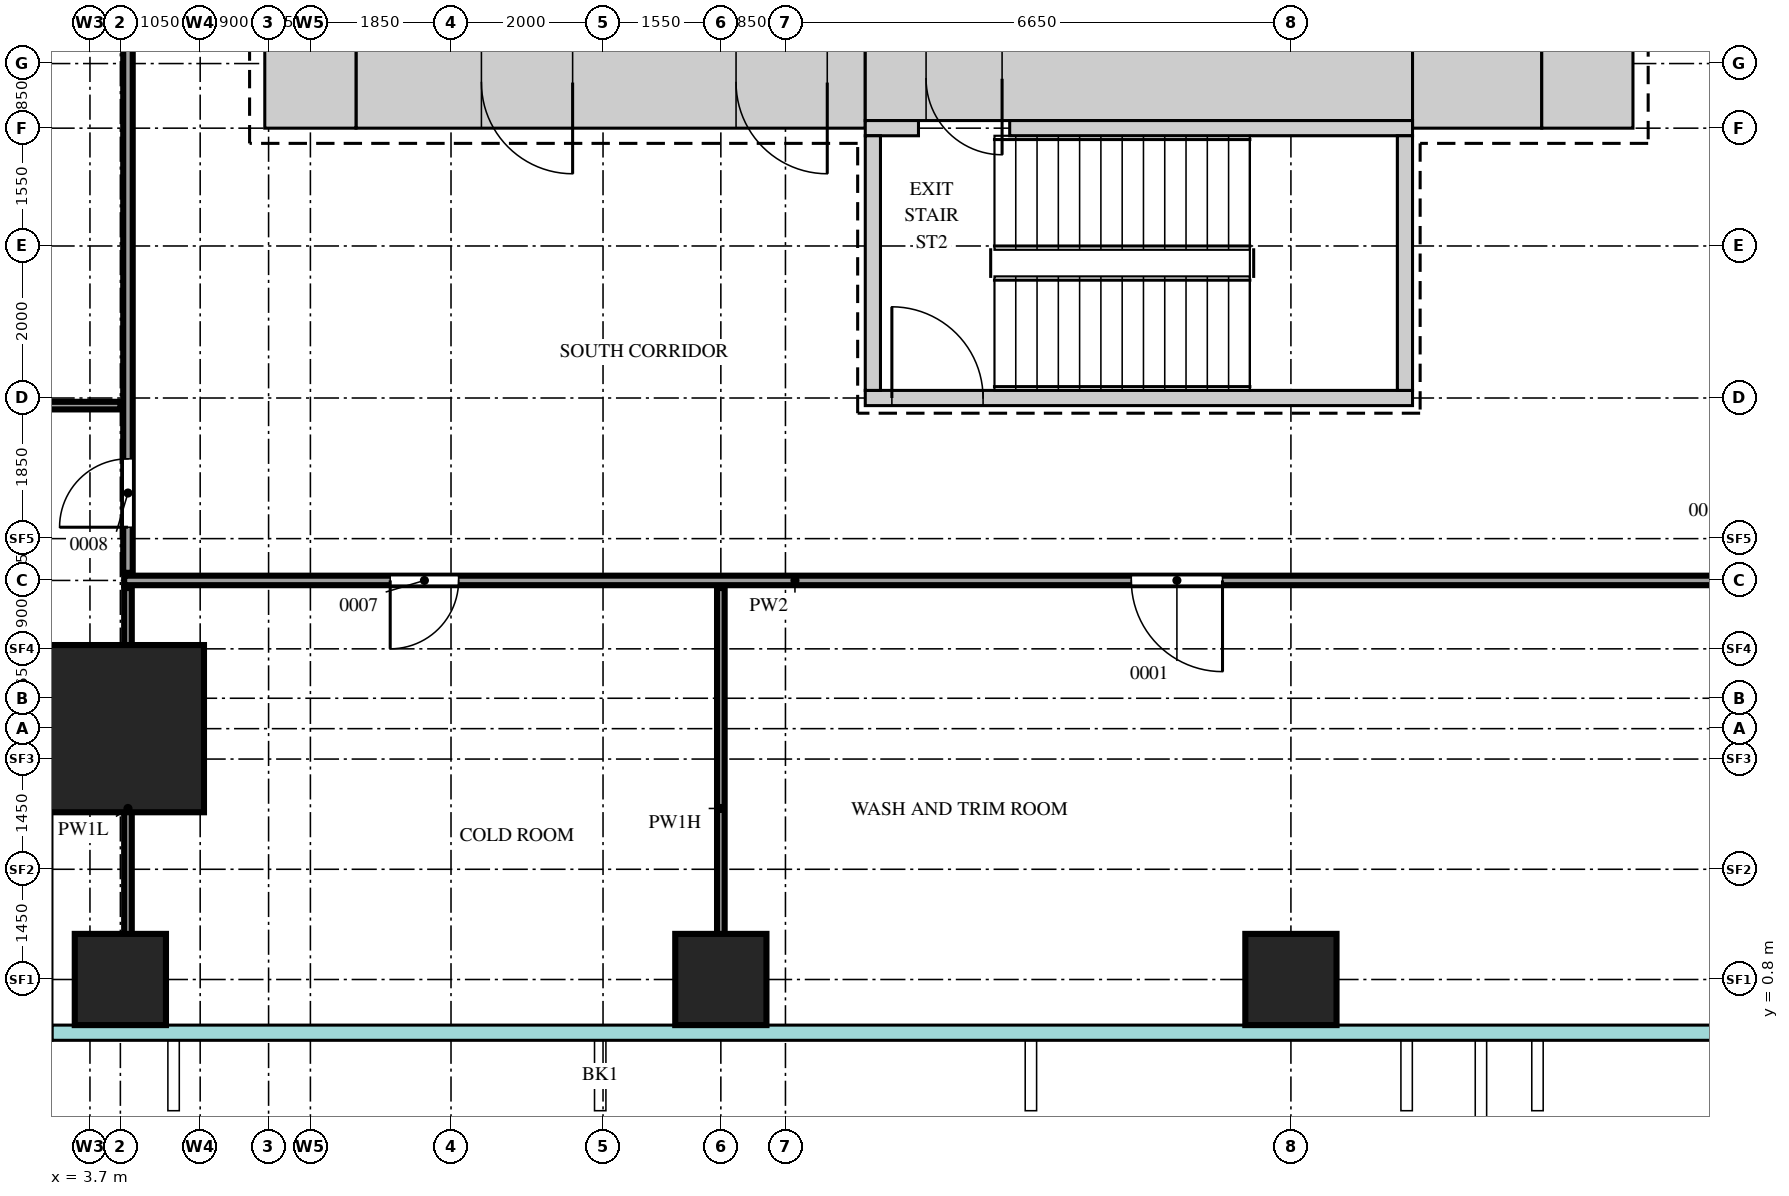
"""IFC4 building model, lengths in metres.
Left out: names, types, materials, properties, quantities, classifications, styles, units other than length and angle.
Written with IfcOpenShell. Run it as: python <this file> out.ifc"""

import sys

from ifc_helpers import new_model, si_unit, direction, frame, frame_2d, origin, origin_2d, place, context, subcontext, project, spatial, rectangle, extrude, source, transform, mapped, element, fill, save


model = new_model("IFC4")
c1 = context("Model", 3, precision=1e-05, world=origin(), true_north=direction((0.0, 1.0)))
c2 = subcontext(c1, "Body", "Model", "MODEL_VIEW")
j1 = project(units=[si_unit("LENGTHUNIT", "METRE"), si_unit("PLANEANGLEUNIT", "RADIAN")], contexts=[c1])
p1 = place(None, origin())
s1 = spatial("IfcSite", under=j1, at=p1, CompositionType="ELEMENT")
p2 = place(p1, origin())
s2 = spatial("IfcBuilding", under=s1, at=p2, CompositionType="ELEMENT")
p3 = place(p2, frame((0.0, 0.0, 33.0)))
s3 = spatial("IfcBuildingStorey", under=s2, at=p3, CompositionType="ELEMENT", Elevation=33.0)
m1 = source(origin(), c2, "Body", "SweptSolid", [
    extrude(rectangle(XDim=6.7, YDim=1.2, at=frame_2d((3.35, 0.0))), origin(), (0.0, 0.0, 1.0), 4.2),
])
p4 = place(p3, frame((7.2, 12.6, 0.0), z_axis=(0.0, 0.0, 1.0), x_axis=(1.0, 0.0, 0.0)))
e1 = element("IfcWall", 1, at=p4, inside=s3, PredefinedType="SHEAR", context=c2, shape_type="MappedRepresentation", body=[
    mapped(m1, transform((0.0, 0.0, 0.0))),
])
m2 = source(origin(), c2, "Body", "SweptSolid", [
    extrude(rectangle(XDim=1.2, YDim=2.1, at=frame_2d((0.6, 1.05))), frame((0.0, 0.61, 0.0), z_axis=(0.0, -1.0, 0.0), x_axis=(1.0, 0.0, 0.0)), (0.0, 0.0, 1.0), 1.22),
])
p5 = place(p4, frame((5.0, 0.0, 0.0)))
e2 = element("IfcOpeningElement", 2, at=p5, cuts=e1, PredefinedType="OPENING", context=c2, shape_type="MappedRepresentation", body=[
    mapped(m2, transform((0.0, 0.0, 0.0))),
])
p6 = place(p4, frame((1.65, 0.0, 0.0)))
e3 = element("IfcOpeningElement", 3, at=p6, cuts=e1, PredefinedType="OPENING", context=c2, shape_type="MappedRepresentation", body=[
    mapped(m2, transform((0.0, 0.0, 0.0))),
])
m3 = source(origin(), c2, "Body", "SweptSolid", [
    extrude(rectangle(XDim=7.2, YDim=1.1, at=frame_2d((3.6, 0.0))), origin(), (0.0, 0.0, 1.0), 4.2),
])
p7 = place(p3, frame((13.9, 12.65, 0.0), z_axis=(0.0, 0.0, 1.0), x_axis=(1.0, 0.0, 0.0)))
e4 = element("IfcWall", 4, at=p7, inside=s3, PredefinedType="SHEAR", context=c2, shape_type="MappedRepresentation", body=[
    mapped(m3, transform((0.0, 0.0, 0.0))),
])
m4 = source(origin(), c2, "Body", "SweptSolid", [
    extrude(rectangle(XDim=1.0, YDim=2.1, at=frame_2d((0.5, 1.05))), frame((0.0, 0.56, 0.0), z_axis=(0.0, -1.0, 0.0), x_axis=(1.0, 0.0, 0.0)), (0.0, 0.0, 1.0), 1.12),
])
p8 = place(p7, frame((0.8, 0.0, 0.0)))
e5 = element("IfcOpeningElement", 5, at=p8, cuts=e4, PredefinedType="OPENING", context=c2, shape_type="MappedRepresentation", body=[
    mapped(m4, transform((0.0, 0.0, 0.0))),
])
m5 = source(origin(), c2, "Body", "SweptSolid", [
    extrude(rectangle(XDim=1.7, YDim=1.2, at=frame_2d((0.85, 0.0))), origin(), (0.0, 0.0, 1.0), 4.2),
])
p9 = place(p3, frame((21.1, 12.6, 0.0), z_axis=(0.0, 0.0, 1.0), x_axis=(1.0, 0.0, 0.0)))
e6 = element("IfcWall", 6, at=p9, inside=s3, PredefinedType="SHEAR", context=c2, shape_type="MappedRepresentation", body=[
    mapped(m5, transform((0.0, 0.0, 0.0))),
])
m6 = source(origin(), c2, "Body", "SweptSolid", [
    extrude(rectangle(XDim=1.2, YDim=1.2, at=frame_2d((0.6, 0.0))), origin(), (0.0, 0.0, 1.0), 4.2),
])
for number, where, z_axis, x_axis in (
    (7, (22.8, 12.6, 0.0), (0.0, 0.0, 1.0), (1.0, 0.0, 0.0)),
    (8, (6.0, 12.6, 0.0), (0.0, 0.0, 1.0), (1.0, 0.0, 0.0)),
):
    element("IfcWall", number, at=place(p3, frame(where, z_axis=z_axis, x_axis=x_axis)), inside=s3, PredefinedType="SHEAR", context=c2, shape_type="MappedRepresentation", body=[
        mapped(m6, transform((0.0, 0.0, 0.0))),
    ])
m7 = source(origin(), c2, "Body", "SweptSolid", [
    extrude(rectangle(XDim=0.7, YDim=0.2, at=frame_2d((0.35, 0.0))), origin(), (0.0, 0.0, 1.0), 4.2),
])
p10 = place(p3, frame((13.9, 12.0, 0.0), z_axis=(0.0, 0.0, 1.0), x_axis=(1.0, 0.0, 0.0)))
e9 = element("IfcWall", 9, at=p10, inside=s3, PredefinedType="SHEAR", context=c2, shape_type="MappedRepresentation", body=[
    mapped(m7, transform((0.0, 0.0, 0.0))),
])
m8 = source(origin(), c2, "Body", "SweptSolid", [
    extrude(rectangle(XDim=5.3, YDim=0.2, at=frame_2d((2.65, 0.0))), origin(), (0.0, 0.0, 1.0), 4.2),
])
p11 = place(p3, frame((15.8, 12.0, 0.0), z_axis=(0.0, 0.0, 1.0), x_axis=(1.0, 0.0, 0.0)))
e10 = element("IfcWall", 10, at=p11, inside=s3, PredefinedType="SHEAR", context=c2, shape_type="MappedRepresentation", body=[
    mapped(m8, transform((0.0, 0.0, 0.0))),
])
m9 = source(origin(), c2, "Body", "SweptSolid", [
    extrude(rectangle(XDim=7.2, YDim=0.2, at=frame_2d((3.6, 0.0))), origin(), (0.0, 0.0, 1.0), 4.2),
])
p12 = place(p3, frame((13.9, 8.45, 0.0), z_axis=(0.0, 0.0, 1.0), x_axis=(1.0, 0.0, 0.0)))
e11 = element("IfcWall", 11, at=p12, inside=s3, PredefinedType="SHEAR", context=c2, shape_type="MappedRepresentation", body=[
    mapped(m9, transform((0.0, 0.0, 0.0))),
])
m10 = source(origin(), c2, "Body", "SweptSolid", [
    extrude(rectangle(XDim=1.2, YDim=2.1, at=frame_2d((0.6, 1.05))), frame((0.0, 0.11, 0.0), z_axis=(0.0, -1.0, 0.0), x_axis=(1.0, 0.0, 0.0)), (0.0, 0.0, 1.0), 0.22),
])
p13 = place(p12, frame((0.35, 0.0, 0.0)))
e12 = element("IfcOpeningElement", 12, at=p13, cuts=e11, PredefinedType="OPENING", context=c2, shape_type="MappedRepresentation", body=[
    mapped(m10, transform((0.0, 0.0, 0.0))),
])
m11 = source(origin(), c2, "Body", "SweptSolid", [
    extrude(rectangle(XDim=3.35, YDim=0.2, at=frame_2d((1.675, 0.0))), origin(), (0.0, 0.0, 1.0), 4.2),
])
for number, where, z_axis, x_axis in (
    (13, (21.0, 8.55, 0.0), (0.0, 0.0, 1.0), (0.0, 1.0, 0.0)),
    (14, (14.0, 8.55, 0.0), (0.0, 0.0, 1.0), (0.0, 1.0, 0.0)),
):
    element("IfcWall", number, at=place(p3, frame(where, z_axis=z_axis, x_axis=x_axis)), inside=s3, PredefinedType="SHEAR", context=c2, shape_type="MappedRepresentation", body=[
        mapped(m11, transform((0.0, 0.0, 0.0))),
    ])
m12 = source(origin(), c2, "Body", "SweptSolid", [
    extrude(rectangle(XDim=2.2, YDim=2.2, at=origin_2d()), origin(), (0.0, 0.0, 1.0), 4.5),
])
p14 = place(p3, frame((4.1, 4.1, 0.0), z_axis=(0.0, 0.0, 1.0), x_axis=(1.0, 0.0, 0.0)))
e15 = element("IfcColumn", 15, at=p14, inside=s3, PredefinedType="COLUMN", context=c2, shape_type="MappedRepresentation", body=[
    mapped(m12, transform((0.0, 0.0, 0.0))),
])
m13 = source(origin(), c2, "Body", "SweptSolid", [
    extrude(rectangle(XDim=1.2, YDim=1.2, at=origin_2d()), origin(), (0.0, 0.0, 1.0), 4.2),
])
for number, where, z_axis, x_axis in (
    (16, (4.1, 0.8, 0.0), (0.0, 0.0, 1.0), (1.0, 0.0, 0.0)),
    (17, (12.0, 0.8, 0.0), (0.0, 0.0, 1.0), (1.0, 0.0, 0.0)),
    (18, (19.5, 0.8, 0.0), (0.0, 0.0, 1.0), (1.0, 0.0, 0.0)),
):
    element("IfcColumn", number, at=place(p3, frame(where, z_axis=z_axis, x_axis=x_axis)), inside=s3, PredefinedType="COLUMN", context=c2, shape_type="MappedRepresentation", body=[
        mapped(m13, transform((0.0, 0.0, 0.0))),
    ])
m14 = source(origin(), c2, "Body", "SweptSolid", [
    extrude(rectangle(XDim=5.8, YDim=0.1, at=frame_2d((2.9, 0.0))), origin(), (0.0, 0.0, 1.0), 3.6),
])
p15 = place(p3, frame((4.2, 0.15, 0.0), z_axis=(0.0, 0.0, 1.0), x_axis=(0.0, 1.0, 0.0)))
e19 = element("IfcWall", 19, at=p15, inside=s3, PredefinedType="PARTITIONING", context=c2, shape_type="MappedRepresentation", body=[
    mapped(m14, transform((0.0, 0.0, 0.0))),
])
m15 = source(origin(), c2, "Body", "SweptSolid", [
    extrude(rectangle(XDim=5.8, YDim=0.1, at=frame_2d((2.9, 0.0))), origin(), (0.0, 0.0, 1.0), 3.7),
])
p16 = place(p3, frame((12.0, 0.15, 0.0), z_axis=(0.0, 0.0, 1.0), x_axis=(0.0, 1.0, 0.0)))
e20 = element("IfcWall", 20, at=p16, inside=s3, PredefinedType="PARTITIONING", context=c2, shape_type="MappedRepresentation", body=[
    mapped(m15, transform((0.0, 0.0, 0.0))),
])
m16 = source(origin(), c2, "Body", "SweptSolid", [
    extrude(rectangle(XDim=22.15, YDim=0.125, at=frame_2d((11.075, 0.0))), origin(), (0.0, 0.0, 1.0), 4.3),
])
p17 = place(p3, frame((4.15, 6.05, 0.0), z_axis=(0.0, 0.0, 1.0), x_axis=(1.0, 0.0, 0.0)))
e21 = element("IfcWall", 21, at=p17, inside=s3, PredefinedType="PARTITIONING", context=c2, shape_type="MappedRepresentation", body=[
    mapped(m16, transform((0.0, 0.0, 0.0))),
])
m17 = source(origin(), c2, "Body", "SweptSolid", [
    extrude(rectangle(XDim=0.9, YDim=2.1, at=frame_2d((0.45, 1.05))), frame((0.0, 0.073, 0.0), z_axis=(0.0, -1.0, 0.0), x_axis=(1.0, 0.0, 0.0)), (0.0, 0.0, 1.0), 0.145),
])
p18 = place(p17, frame((3.5, 0.0, 0.0)))
e22 = element("IfcOpeningElement", 22, at=p18, cuts=e21, PredefinedType="OPENING", context=c2, shape_type="MappedRepresentation", body=[
    mapped(m17, transform((0.0, 0.0, 0.0))),
])
m18 = source(origin(), c2, "Body", "SweptSolid", [
    extrude(rectangle(XDim=1.2, YDim=2.1, at=frame_2d((0.6, 1.05))), frame((0.0, 0.073, 0.0), z_axis=(0.0, -1.0, 0.0), x_axis=(1.0, 0.0, 0.0)), (0.0, 0.0, 1.0), 0.145),
])
p19 = place(p17, frame((13.25, 0.0, 0.0)))
e23 = element("IfcOpeningElement", 23, at=p19, cuts=e21, PredefinedType="OPENING", context=c2, shape_type="MappedRepresentation", body=[
    mapped(m18, transform((0.0, 0.0, 0.0))),
])
m19 = source(origin(), c2, "Body", "SweptSolid", [
    extrude(rectangle(XDim=27.75, YDim=0.125, at=frame_2d((13.875, 0.0))), origin(), (0.0, 0.0, 1.0), 4.3),
])
p20 = place(p3, frame((4.2, 6.15, 0.0), z_axis=(0.0, 0.0, 1.0), x_axis=(0.0, 1.0, 0.0)))
e24 = element("IfcWall", 24, at=p20, inside=s3, PredefinedType="PARTITIONING", context=c2, shape_type="MappedRepresentation", body=[
    mapped(m19, transform((0.0, 0.0, 0.0))),
])
p21 = place(p20, frame((0.6, 0.0, 0.0)))
e25 = element("IfcOpeningElement", 25, at=p21, cuts=e24, PredefinedType="OPENING", context=c2, shape_type="MappedRepresentation", body=[
    mapped(m17, transform((0.0, 0.0, 0.0))),
])
p22 = place(p20, frame((7.45, 0.0, 0.0)))
e26 = element("IfcOpeningElement", 26, at=p22, cuts=e24, PredefinedType="OPENING", context=c2, shape_type="MappedRepresentation", body=[
    mapped(m17, transform((0.0, 0.0, 0.0))),
])
p23 = place(p20, frame((20.55, 0.0, 0.0)))
e27 = element("IfcOpeningElement", 27, at=p23, cuts=e24, PredefinedType="OPENING", context=c2, shape_type="MappedRepresentation", body=[
    mapped(m17, transform((0.0, 0.0, 0.0))),
])
m20 = source(origin(), c2, "Body", "SweptSolid", [
    extrude(rectangle(XDim=3.95, YDim=0.1, at=frame_2d((1.975, 0.0))), origin(), (0.0, 0.0, 1.0), 4.3),
])
p24 = place(p3, frame((0.15, 8.35, 0.0), z_axis=(0.0, 0.0, 1.0), x_axis=(1.0, 0.0, 0.0)))
e28 = element("IfcWall", 28, at=p24, inside=s3, PredefinedType="PARTITIONING", context=c2, shape_type="MappedRepresentation", body=[
    mapped(m20, transform((0.0, 0.0, 0.0))),
])
m21 = source(origin(), c2, "Body", "SweptSolid", [
    extrude(rectangle(XDim=1.2, YDim=2.1, at=frame_2d((0.6, 1.05))), frame((0.0, 0.55, 0.0), z_axis=(0.0, -1.0, 0.0), x_axis=(1.0, 0.0, 0.0)), (0.0, 0.0, 1.0), 1.1),
])
p25 = place(p5, origin())
e29 = element("IfcDoor", 29, at=p25, inside=s3, OperationType="SINGLE_SWING_RIGHT", PredefinedType="DOOR", context=c2, shape_type="MappedRepresentation", body=[
    mapped(m21, transform((0.0, 0.0, 0.0))),
])
fill(e2, e29)
p26 = place(p6, origin())
e30 = element("IfcDoor", 30, at=p26, inside=s3, OperationType="SINGLE_SWING_RIGHT", PredefinedType="DOOR", context=c2, shape_type="MappedRepresentation", body=[
    mapped(m21, transform((0.0, 0.0, 0.0))),
])
fill(e3, e30)
m22 = source(origin(), c2, "Body", "SweptSolid", [
    extrude(rectangle(XDim=1.0, YDim=2.1, at=frame_2d((0.5, 1.05))), frame((0.0, 0.5, 0.0), z_axis=(0.0, -1.0, 0.0), x_axis=(1.0, 0.0, 0.0)), (0.0, 0.0, 1.0), 1.0),
])
p27 = place(p8, origin())
e31 = element("IfcDoor", 31, at=p27, inside=s3, OperationType="SINGLE_SWING_RIGHT", PredefinedType="DOOR", context=c2, shape_type="MappedRepresentation", body=[
    mapped(m22, transform((0.0, 0.0, 0.0))),
])
fill(e5, e31)
m23 = source(origin(), c2, "Body", "SweptSolid", [
    extrude(rectangle(XDim=0.9, YDim=2.1, at=frame_2d((0.45, 1.05))), frame((0.0, 0.025, 0.0), z_axis=(0.0, -1.0, 0.0), x_axis=(1.0, 0.0, 0.0)), (0.0, 0.0, 1.0), 0.05),
])
p28 = place(p21, origin())
e32 = element("IfcDoor", 32, at=p28, inside=s3, OperationType="SINGLE_SWING_RIGHT", PredefinedType="DOOR", context=c2, shape_type="MappedRepresentation", body=[
    mapped(m23, transform((0.0, 0.0, 0.0))),
])
fill(e25, e32)
p29 = place(p18, origin())
e33 = element("IfcDoor", 33, at=p29, inside=s3, OperationType="SINGLE_SWING_LEFT", PredefinedType="DOOR", context=c2, shape_type="MappedRepresentation", body=[
    mapped(m23, transform((0.0, 0.0, 0.0))),
])
fill(e22, e33)
m24 = source(origin(), c2, "Body", "SweptSolid", [
    extrude(rectangle(XDim=1.2, YDim=2.1, at=frame_2d((0.6, 1.05))), frame((0.0, 0.025, 0.0), z_axis=(0.0, -1.0, 0.0), x_axis=(1.0, 0.0, 0.0)), (0.0, 0.0, 1.0), 0.05),
])
p30 = place(p19, origin())
e34 = element("IfcDoor", 34, at=p30, inside=s3, OperationType="SINGLE_SWING_RIGHT", PredefinedType="DOOR", context=c2, shape_type="MappedRepresentation", body=[
    mapped(m24, transform((0.0, 0.0, 0.0))),
])
fill(e23, e34)
p31 = place(p13, origin())
e35 = element("IfcDoor", 35, at=p31, inside=s3, OperationType="SINGLE_SWING_RIGHT", PredefinedType="DOOR", context=c2, shape_type="MappedRepresentation", body=[
    mapped(m24, transform((0.0, 0.0, 0.0))),
])
fill(e12, e35)
save(model, sys.argv[1])
